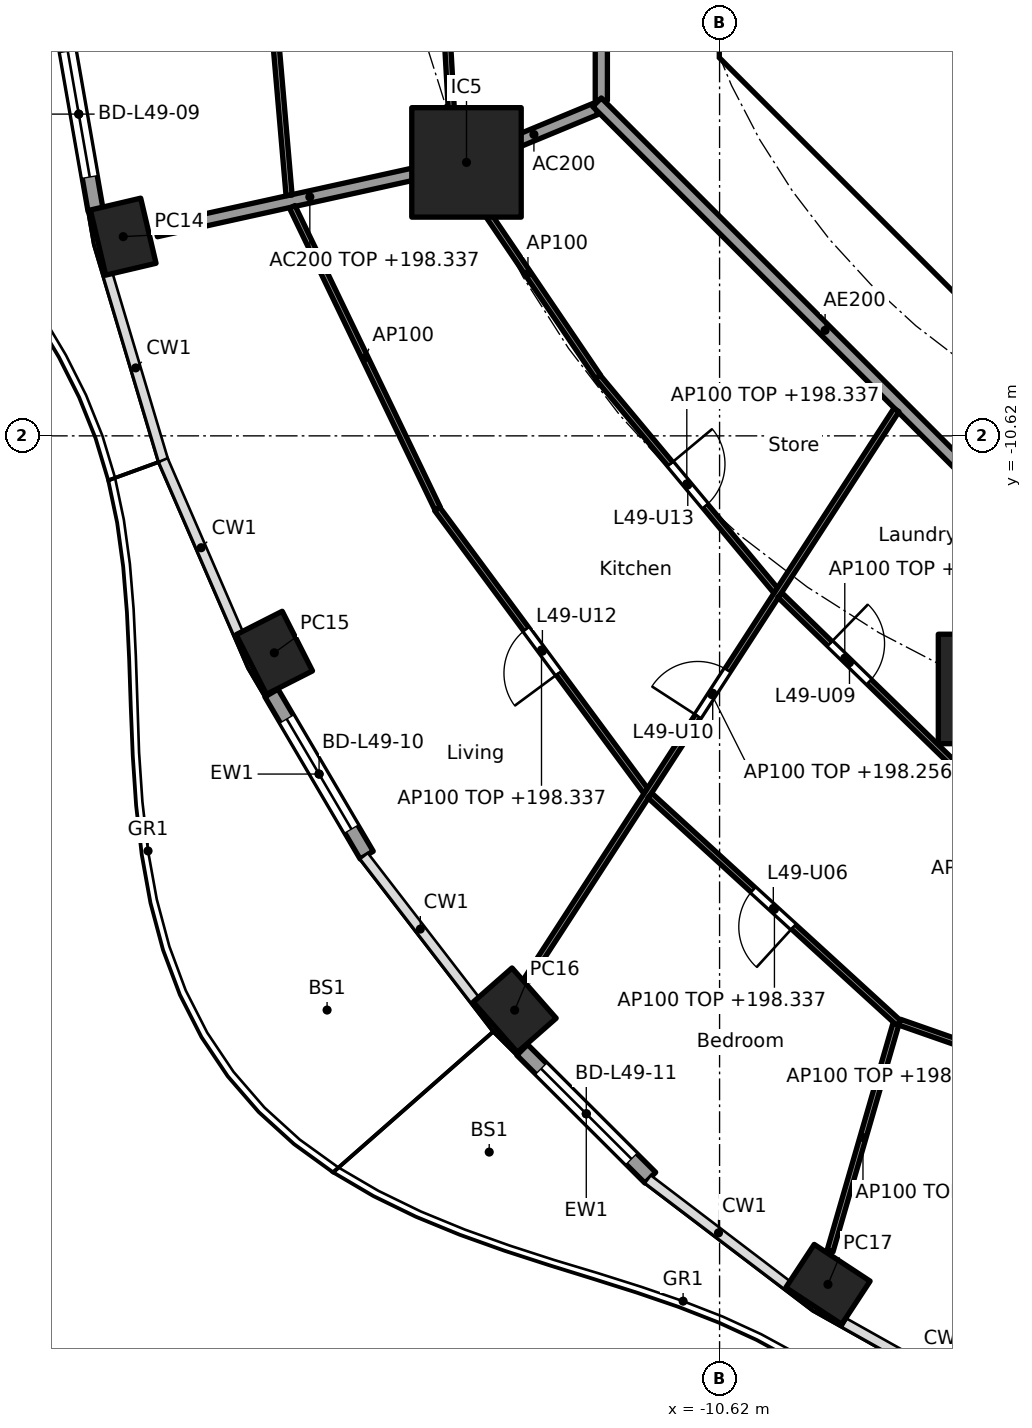
"""IFC4 building model, lengths in metres.
Left out: names, types, materials, properties, quantities, classifications, styles, units other than length and angle.
Written with IfcOpenShell. Run it as: python <this file> out.ifc"""

import sys

from ifc_helpers import new_model, si_unit, direction, frame, frame_2d, origin, origin_2d, place, context, subcontext, project, spatial, polyline, rectangle, hollow_rectangle, outline, extrude, element, fill, save


model = new_model("IFC4")
c1 = context("Model", 3, precision=1e-05, world=origin(), true_north=direction((0.0, 1.0)))
c2 = subcontext(c1, "Body", "Model", "MODEL_VIEW")
j1 = project(units=[si_unit("LENGTHUNIT", "METRE"), si_unit("PLANEANGLEUNIT", "RADIAN")], contexts=[c1])
p1 = place(None, origin())
s1 = spatial("IfcSite", under=j1, at=p1, CompositionType="ELEMENT")
p2 = place(p1, origin())
s2 = spatial("IfcBuilding", under=s1, at=p2, CompositionType="ELEMENT")
p3 = place(p2, frame((0.0, 0.0, 195.5)))
s3 = spatial("IfcBuildingStorey", under=s2, at=p3, CompositionType="ELEMENT", Elevation=195.5)
for number, where, z_axis, x_axis in (
    (1, (-20.427, -7.344, 0.0), (0.0, 0.0, 1.0), (0.229, -0.973, 0.0)),
    (2, (-17.942, -14.188, 0.0), (0.0, 0.0, 1.0), (0.452, -0.892, 0.0)),
    (3, (-13.989, -20.064, 0.0), (0.0, 0.0, 1.0), (0.66, -0.751, 0.0)),
    (4, (-8.837, -24.573, 0.0), (0.0, 0.0, 1.0), (0.836, -0.549, 0.0)),
):
    element("IfcColumn", number, at=place(p3, frame(where, z_axis=z_axis, x_axis=x_axis)), inside=s3, PredefinedType="COLUMN", context=c2, shape_type="SweptSolid", body=[
        extrude(hollow_rectangle(XDim=1.1, YDim=0.85, WallThickness=0.036, at=origin_2d()), origin(), (0.0, 0.0, 1.0), 3.7),
    ])
for number, where, z_axis, x_axis in (
    (5, (-14.782, -6.123, 0.0), (0.0, 0.0, 1.0), (1.0, 0.0, 0.0)),
    (6, (-6.123, -14.782, 0.0), (0.0, 0.0, 1.0), (1.0, 0.0, 0.0)),
):
    element("IfcColumn", number, at=place(p3, frame(where, z_axis=z_axis, x_axis=x_axis)), inside=s3, PredefinedType="COLUMN", context=c2, shape_type="SweptSolid", body=[
        extrude(rectangle(XDim=1.8, YDim=1.8, at=origin_2d()), origin(), (0.0, 0.0, 1.0), 3.7),
    ])
p4 = place(p3, frame((-20.882, -6.91, 0.0), z_axis=(0.0, 0.0, 1.0), x_axis=(-0.172223552479, 0.98505789067, 0.0)))
e7 = element("IfcWall", 7, at=p4, inside=s3, PredefinedType="SOLIDWALL", context=c2, shape_type="SweptSolid", body=[
    extrude(rectangle(XDim=3.211, YDim=0.25, at=frame_2d((1.605, 0.0))), origin(), (0.0, 0.0, 1.0), 3.44),
])
p5 = place(p4, frame((0.555, 0.0, 0.0)))
e8 = element("IfcOpeningElement", 8, at=p5, cuts=e7, PredefinedType="OPENING", context=c2, shape_type="SweptSolid", body=[
    extrude(rectangle(XDim=2.1, YDim=2.4, at=frame_2d((1.05, 1.2))), frame((0.0, 0.135, 0.0), z_axis=(0.0, -1.0, 0.0), x_axis=(1.0, 0.0, 0.0)), (0.0, 0.0, 1.0), 0.27),
])
p6 = place(p3, frame((-16.424, -17.515, 0.0), z_axis=(0.0, 0.0, 1.0), x_axis=(-0.506309086483, 0.862352079458, 0.0)))
e9 = element("IfcWall", 9, at=p6, inside=s3, PredefinedType="SOLIDWALL", context=c2, shape_type="SweptSolid", body=[
    extrude(rectangle(XDim=3.092, YDim=0.25, at=frame_2d((1.546, 0.0))), origin(), (0.0, 0.0, 1.0), 3.44),
])
p7 = place(p6, frame((0.496, 0.0, 0.0)))
e10 = element("IfcOpeningElement", 10, at=p7, cuts=e9, PredefinedType="OPENING", context=c2, shape_type="SweptSolid", body=[
    extrude(rectangle(XDim=2.1, YDim=2.4, at=frame_2d((1.05, 1.2))), frame((0.0, 0.135, 0.0), z_axis=(0.0, -1.0, 0.0), x_axis=(1.0, 0.0, 0.0)), (0.0, 0.0, 1.0), 0.27),
])
p8 = place(p3, frame((-11.759, -22.82, 0.0), z_axis=(0.0, 0.0, 1.0), x_axis=(-0.707844845069, 0.706367946122, 0.0)))
e11 = element("IfcWall", 11, at=p8, inside=s3, PredefinedType="SOLIDWALL", context=c2, shape_type="SweptSolid", body=[
    extrude(rectangle(XDim=2.976, YDim=0.25, at=frame_2d((1.488, 0.0))), origin(), (0.0, 0.0, 1.0), 3.44),
])
p9 = place(p8, frame((0.438, 0.0, 0.0)))
e12 = element("IfcOpeningElement", 12, at=p9, cuts=e11, PredefinedType="OPENING", context=c2, shape_type="SweptSolid", body=[
    extrude(rectangle(XDim=2.1, YDim=2.4, at=frame_2d((1.05, 1.2))), frame((0.0, 0.135, 0.0), z_axis=(0.0, -1.0, 0.0), x_axis=(1.0, 0.0, 0.0)), (0.0, 0.0, 1.0), 0.27),
])
p10 = place(p3, frame((-9.988, -4.613, 0.0), z_axis=(0.0, 0.0, 1.0), x_axis=(0.707106781187, -0.707106781187, 0.0)))
e13 = element("IfcWall", 13, at=p10, inside=s3, PredefinedType="SHEAR", context=c2, shape_type="SweptSolid", body=[
    extrude(rectangle(XDim=7.602, YDim=0.6, at=frame_2d((3.801, 0.0))), origin(), (0.0, 0.0, 1.0), 3.44),
])
p11 = place(p10, frame((6.151, 0.0, 0.0)))
e14 = element("IfcOpeningElement", 14, at=p11, cuts=e13, PredefinedType="OPENING", context=c2, shape_type="SweptSolid", body=[
    extrude(rectangle(XDim=1.1, YDim=2.1, at=frame_2d((0.55, 1.05))), frame((0.0, 0.31, 0.0), z_axis=(0.0, -1.0, 0.0), x_axis=(1.0, 0.0, 0.0)), (0.0, 0.0, 1.0), 0.62),
])
p12 = place(p3, origin())
e15 = element("IfcWall", 15, at=p12, inside=s3, PredefinedType="SHEAR", context=c2, shape_type="SweptSolid", body=[
    extrude(outline(polyline([(-10.625, -3.801), (-10.025, -3.801), (-10.025, -4.152), (-9.776, -4.401), (-10.2, -4.825), (-10.625, -4.401), (-10.625, -3.801)])), origin(), (0.0, 0.0, 1.0), 3.44),
])
p13 = place(p3, frame((-8.301, -5.8, 0.0), z_axis=(0.0, 0.0, 1.0), x_axis=(1.0, 0.0, 0.0)))
e16 = element("IfcWall", 16, at=p13, inside=s3, PredefinedType="PARTITIONING", context=c2, shape_type="SweptSolid", body=[
    extrude(rectangle(XDim=2.026, YDim=0.15, at=frame_2d((1.013, 0.0))), origin(), (0.0, 0.0, 1.0), 3.44),
])
p14 = place(p3, frame((-12.657, -5.243, 0.0), z_axis=(0.0, 0.0, 1.0), x_axis=(-0.923859888513, -0.38273085373, 0.0)))
e17 = element("IfcWall", 17, at=p14, inside=s3, PredefinedType="PARTITIONING", context=c2, shape_type="SweptSolid", body=[
    extrude(rectangle(XDim=2.199, YDim=0.2, at=frame_2d((1.1, 0.0))), origin(), (0.0, 0.0, 1.0), 3.44),
])
p15 = place(p3, frame((-14.831, -6.134, 0.0), z_axis=(0.0, 0.0, 1.0), x_axis=(-0.976568396888, -0.215207263354, 0.0)))
e18 = element("IfcWall", 18, at=p15, inside=s3, PredefinedType="PARTITIONING", context=c2, shape_type="SweptSolid", body=[
    extrude(rectangle(XDim=5.177, YDim=0.2, at=frame_2d((2.588, 0.0))), origin(), (0.0, 0.0, 1.0), 2.837),
])
p16 = place(p3, frame((-12.565, 5.304, 0.0), z_axis=(0.0, 0.0, 1.0), x_axis=(0.0, -1.0, 0.0)))
e19 = element("IfcWall", 19, at=p16, inside=s3, PredefinedType="PARTITIONING", context=c2, shape_type="SweptSolid", body=[
    extrude(rectangle(XDim=10.409, YDim=0.2, at=frame_2d((5.205, 0.0))), origin(), (0.0, 0.0, 1.0), 3.44),
])
p17 = place(p3, frame((-12.635, -5.134, 0.0), z_axis=(0.0, 0.0, 1.0), x_axis=(0.707106781187, -0.707106781187, 0.0)))
e20 = element("IfcWall", 20, at=p17, inside=s3, PredefinedType="PARTITIONING", context=c2, shape_type="SweptSolid", body=[
    extrude(rectangle(XDim=10.609, YDim=0.2, at=frame_2d((5.305, 0.0))), origin(), (0.0, 0.0, 1.0), 3.44),
])
p18 = place(p3, frame((-15.331, 0.05, 0.0), z_axis=(0.0, 0.0, 1.0), x_axis=(0.056310939406, -0.998413280212, 0.0)))
e21 = element("IfcWall", 21, at=p18, inside=s3, PredefinedType="PARTITIONING", context=c2, shape_type="SweptSolid", body=[
    extrude(rectangle(XDim=6.126, YDim=0.1, at=frame_2d((3.063, 0.0))), origin(), (0.0, 0.0, 1.0), 2.837),
])
p19 = place(p3, frame((-18.271, -0.05, 0.0), z_axis=(0.0, 0.0, 1.0), x_axis=(0.086012321907, -0.996294073294, 0.0)))
e22 = element("IfcWall", 22, at=p19, inside=s3, PredefinedType="PARTITIONING", context=c2, shape_type="SweptSolid", body=[
    extrude(rectangle(XDim=6.639, YDim=0.1, at=frame_2d((3.32, 0.0))), origin(), (0.0, 0.0, 1.0), 2.837),
])
p20 = place(p3, frame((-14.924, -6.249, 0.0), z_axis=(0.0, 0.0, 1.0), x_axis=(0.561046521684, -0.82778427172, 0.0)))
e23 = element("IfcWall", 23, at=p20, inside=s3, PredefinedType="PARTITIONING", context=c2, shape_type="SweptSolid", body=[
    extrude(rectangle(XDim=4.109, YDim=0.1, at=frame_2d((2.054, 0.0))), origin(), (0.0, 0.0, 1.0), 3.44),
])
p21 = place(p3, frame((-17.647, -6.854, 0.0), z_axis=(0.0, 0.0, 1.0), x_axis=(0.434027506504, -0.900899619046, 0.0)))
e24 = element("IfcWall", 24, at=p21, inside=s3, PredefinedType="PARTITIONING", context=c2, shape_type="SweptSolid", body=[
    extrude(rectangle(XDim=5.508, YDim=0.1, at=frame_2d((2.754, 0.0))), origin(), (0.0, 0.0, 1.0), 3.44),
])
p22 = place(p3, frame((-12.623, -9.653, 0.0), z_axis=(0.0, 0.0, 1.0), x_axis=(0.640315711982, -0.768111833647, 0.0)))
e25 = element("IfcWall", 25, at=p22, inside=s3, PredefinedType="PARTITIONING", context=c2, shape_type="SweptSolid", body=[
    extrude(rectangle(XDim=4.572, YDim=0.1, at=frame_2d((2.286, 0.0))), origin(), (0.0, 0.0, 1.0), 2.837),
])
p23 = place(p22, frame((1.861, 0.0, 0.0)))
e26 = element("IfcOpeningElement", 26, at=p23, cuts=e25, PredefinedType="OPENING", context=c2, shape_type="SweptSolid", body=[
    extrude(rectangle(XDim=0.9, YDim=2.1, at=frame_2d((0.45, 1.05))), frame((0.0, 0.06, 0.0), z_axis=(0.0, -1.0, 0.0), x_axis=(1.0, 0.0, 0.0)), (0.0, 0.0, 1.0), 0.12),
])
p24 = place(p3, frame((-15.265, -11.821, 0.0), z_axis=(0.0, 0.0, 1.0), x_axis=(0.594721645029, -0.803931691709, 0.0)))
e27 = element("IfcWall", 27, at=p24, inside=s3, PredefinedType="PARTITIONING", context=c2, shape_type="SweptSolid", body=[
    extrude(rectangle(XDim=5.772, YDim=0.1, at=frame_2d((2.886, 0.0))), origin(), (0.0, 0.0, 1.0), 2.837),
])
p25 = place(p24, frame((2.461, 0.0, 0.0)))
e28 = element("IfcOpeningElement", 28, at=p25, cuts=e27, PredefinedType="OPENING", context=c2, shape_type="SweptSolid", body=[
    extrude(rectangle(XDim=0.9, YDim=2.1, at=frame_2d((0.45, 1.05))), frame((0.0, 0.06, 0.0), z_axis=(0.0, -1.0, 0.0), x_axis=(1.0, 0.0, 0.0)), (0.0, 0.0, 1.0), 0.12),
])
p26 = place(p3, frame((-7.712, -10.195, 0.0), z_axis=(0.0, 0.0, 1.0), x_axis=(-0.544176533609, -0.838970738625, 0.0)))
e29 = element("IfcWall", 29, at=p26, inside=s3, PredefinedType="PARTITIONING", context=c2, shape_type="SweptSolid", body=[
    extrude(rectangle(XDim=11.156, YDim=0.1, at=frame_2d((5.578, 0.0))), origin(), (0.0, 0.0, 1.0), 2.756),
])
p27 = place(p26, frame((5.101, 0.0, 0.0)))
e30 = element("IfcOpeningElement", 30, at=p27, cuts=e29, PredefinedType="OPENING", context=c2, shape_type="SweptSolid", body=[
    extrude(rectangle(XDim=0.9, YDim=2.1, at=frame_2d((0.45, 1.05))), frame((0.0, 0.06, 0.0), z_axis=(0.0, -1.0, 0.0), x_axis=(1.0, 0.0, 0.0)), (0.0, 0.0, 1.0), 0.12),
])
p28 = place(p3, frame((-9.627, -13.238, 0.0), z_axis=(0.0, 0.0, 1.0), x_axis=(0.716946269374, -0.697128429223, 0.0)))
e31 = element("IfcWall", 31, at=p28, inside=s3, PredefinedType="PARTITIONING", context=c2, shape_type="SweptSolid", body=[
    extrude(rectangle(XDim=4.25, YDim=0.1, at=frame_2d((2.125, 0.0))), origin(), (0.0, 0.0, 1.0), 2.837),
])
p29 = place(p28, frame((1.145, 0.0, 0.0)))
e32 = element("IfcOpeningElement", 32, at=p29, cuts=e31, PredefinedType="OPENING", context=c2, shape_type="SweptSolid", body=[
    extrude(rectangle(XDim=0.9, YDim=2.1, at=frame_2d((0.45, 1.05))), frame((0.0, 0.06, 0.0), z_axis=(0.0, -1.0, 0.0), x_axis=(1.0, 0.0, 0.0)), (0.0, 0.0, 1.0), 0.12),
])
p30 = place(p3, frame((-11.766, -16.535, 0.0), z_axis=(0.0, 0.0, 1.0), x_axis=(0.738053852169, -0.674741810842, 0.0)))
e33 = element("IfcWall", 33, at=p30, inside=s3, PredefinedType="PARTITIONING", context=c2, shape_type="SweptSolid", body=[
    extrude(rectangle(XDim=5.549, YDim=0.1, at=frame_2d((2.774, 0.0))), origin(), (0.0, 0.0, 1.0), 2.837),
])
p31 = place(p30, frame((2.3, 0.0, 0.0)))
e34 = element("IfcOpeningElement", 34, at=p31, cuts=e33, PredefinedType="OPENING", context=c2, shape_type="SweptSolid", body=[
    extrude(rectangle(XDim=0.9, YDim=2.1, at=frame_2d((0.45, 1.05))), frame((0.0, 0.06, 0.0), z_axis=(0.0, -1.0, 0.0), x_axis=(1.0, 0.0, 0.0)), (0.0, 0.0, 1.0), 0.12),
])
p32 = place(p3, frame((-7.721, -20.293, 0.0), z_axis=(0.0, 0.0, 1.0), x_axis=(-0.278445616281, -0.960451997121, 0.0)))
e35 = element("IfcWall", 35, at=p32, inside=s3, PredefinedType="PARTITIONING", context=c2, shape_type="SweptSolid", body=[
    extrude(rectangle(XDim=3.885, YDim=0.1, at=frame_2d((1.942, 0.0))), origin(), (0.0, 0.0, 1.0), 2.837),
])
p33 = place(p3, frame((-7.66, -20.262, 0.0), z_axis=(0.0, 0.0, 1.0), x_axis=(0.943911038661, -0.330199865375, 0.0)))
e36 = element("IfcWall", 36, at=p33, inside=s3, PredefinedType="PARTITIONING", context=c2, shape_type="SweptSolid", body=[
    extrude(rectangle(XDim=5.417, YDim=0.1, at=frame_2d((2.709, 0.0))), origin(), (0.0, 0.0, 1.0), 2.837),
])
p34 = place(p33, frame((2.259, 0.0, 0.0)))
e37 = element("IfcOpeningElement", 37, at=p34, cuts=e36, PredefinedType="OPENING", context=c2, shape_type="SweptSolid", body=[
    extrude(rectangle(XDim=0.9, YDim=2.1, at=frame_2d((0.45, 1.05))), frame((0.0, 0.06, 0.0), z_axis=(0.0, -1.0, 0.0), x_axis=(1.0, 0.0, 0.0)), (0.0, 0.0, 1.0), 0.12),
])
p35 = place(p5, origin())
e38 = element("IfcDoor", 38, at=p35, inside=s3, OperationType="SLIDING_TO_LEFT", PredefinedType="DOOR", context=c2, shape_type="SweptSolid", body=[
    extrude(rectangle(XDim=2.1, YDim=2.4, at=frame_2d((1.05, 1.2))), frame((0.0, 0.025, 0.0), z_axis=(0.0, -1.0, 0.0), x_axis=(1.0, 0.0, 0.0)), (0.0, 0.0, 1.0), 0.05),
])
fill(e8, e38)
p36 = place(p7, origin())
e39 = element("IfcDoor", 39, at=p36, inside=s3, OperationType="SLIDING_TO_LEFT", PredefinedType="DOOR", context=c2, shape_type="SweptSolid", body=[
    extrude(rectangle(XDim=2.1, YDim=2.4, at=frame_2d((1.05, 1.2))), frame((0.0, 0.025, 0.0), z_axis=(0.0, -1.0, 0.0), x_axis=(1.0, 0.0, 0.0)), (0.0, 0.0, 1.0), 0.05),
])
fill(e10, e39)
p37 = place(p9, origin())
e40 = element("IfcDoor", 40, at=p37, inside=s3, OperationType="SLIDING_TO_LEFT", PredefinedType="DOOR", context=c2, shape_type="SweptSolid", body=[
    extrude(rectangle(XDim=2.1, YDim=2.4, at=frame_2d((1.05, 1.2))), frame((0.0, 0.025, 0.0), z_axis=(0.0, -1.0, 0.0), x_axis=(1.0, 0.0, 0.0)), (0.0, 0.0, 1.0), 0.05),
])
fill(e12, e40)
p38 = place(p31, frame((0.9, 0.0, 0.0), x_axis=(-1.0, 0.0, 0.0)))
e41 = element("IfcDoor", 41, at=p38, inside=s3, OperationType="SINGLE_SWING_LEFT", PredefinedType="DOOR", context=c2, shape_type="SweptSolid", body=[
    extrude(rectangle(XDim=0.9, YDim=2.1, at=frame_2d((0.45, 1.05))), frame((0.0, 0.025, 0.0), z_axis=(0.0, -1.0, 0.0), x_axis=(1.0, 0.0, 0.0)), (0.0, 0.0, 1.0), 0.05),
])
fill(e34, e41)
p39 = place(p29, origin())
e42 = element("IfcDoor", 42, at=p39, inside=s3, OperationType="SINGLE_SWING_LEFT", PredefinedType="DOOR", context=c2, shape_type="SweptSolid", body=[
    extrude(rectangle(XDim=0.9, YDim=2.1, at=frame_2d((0.45, 1.05))), frame((0.0, 0.025, 0.0), z_axis=(0.0, -1.0, 0.0), x_axis=(1.0, 0.0, 0.0)), (0.0, 0.0, 1.0), 0.05),
])
fill(e32, e42)
p40 = place(p27, frame((0.9, 0.0, 0.0), x_axis=(-1.0, 0.0, 0.0)))
e43 = element("IfcDoor", 43, at=p40, inside=s3, OperationType="SINGLE_SWING_LEFT", PredefinedType="DOOR", context=c2, shape_type="SweptSolid", body=[
    extrude(rectangle(XDim=0.9, YDim=2.1, at=frame_2d((0.45, 1.05))), frame((0.0, 0.025, 0.0), z_axis=(0.0, -1.0, 0.0), x_axis=(1.0, 0.0, 0.0)), (0.0, 0.0, 1.0), 0.05),
])
fill(e30, e43)
p41 = place(p25, frame((0.9, 0.0, 0.0), x_axis=(-1.0, 0.0, 0.0)))
e44 = element("IfcDoor", 44, at=p41, inside=s3, OperationType="SINGLE_SWING_LEFT", PredefinedType="DOOR", context=c2, shape_type="SweptSolid", body=[
    extrude(rectangle(XDim=0.9, YDim=2.1, at=frame_2d((0.45, 1.05))), frame((0.0, 0.025, 0.0), z_axis=(0.0, -1.0, 0.0), x_axis=(1.0, 0.0, 0.0)), (0.0, 0.0, 1.0), 0.05),
])
fill(e28, e44)
p42 = place(p23, origin())
e45 = element("IfcDoor", 45, at=p42, inside=s3, OperationType="SINGLE_SWING_LEFT", PredefinedType="DOOR", context=c2, shape_type="SweptSolid", body=[
    extrude(rectangle(XDim=0.9, YDim=2.1, at=frame_2d((0.45, 1.05))), frame((0.0, 0.025, 0.0), z_axis=(0.0, -1.0, 0.0), x_axis=(1.0, 0.0, 0.0)), (0.0, 0.0, 1.0), 0.05),
])
fill(e26, e45)
save(model, sys.argv[1])
